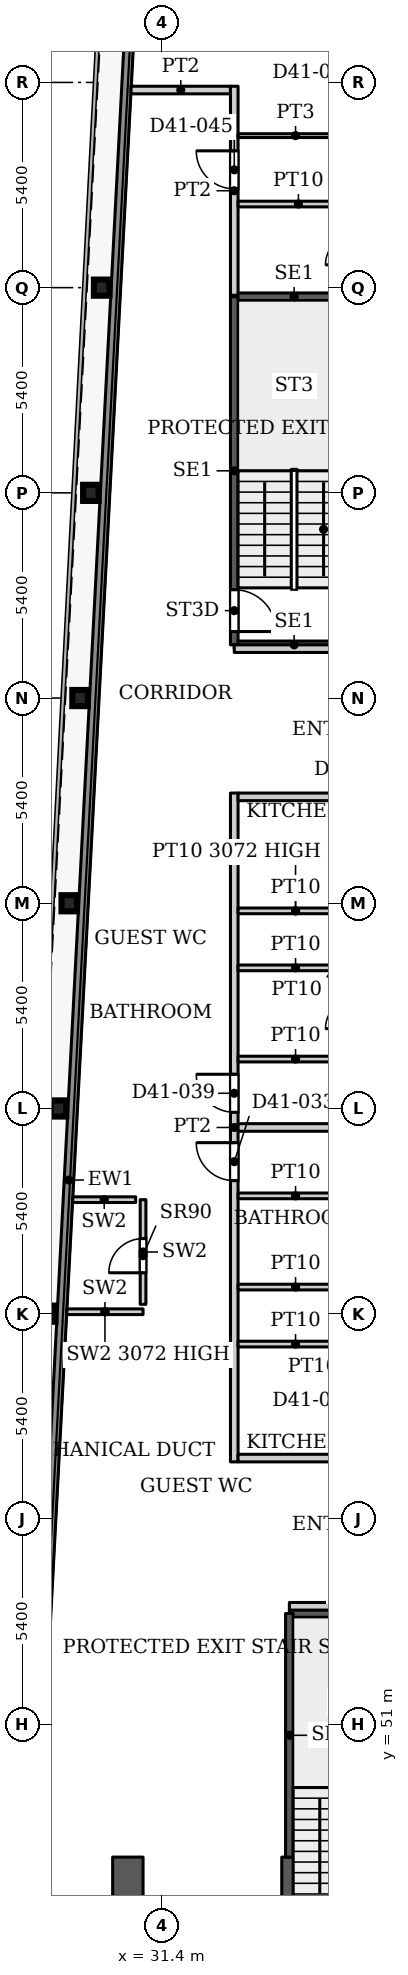
"""IFC4 building model, lengths in metres.
Left out: names, types, materials, properties, quantities, classifications, styles, units other than length and angle.
Written with IfcOpenShell. Run it as: python <this file> out.ifc"""

import sys

from ifc_helpers import new_model, si_unit, direction, frame, frame_2d, origin, origin_2d, place, context, subcontext, project, spatial, rectangle, i_section, extrude, source, transform, mapped, element, fill, save


model = new_model("IFC4")
c1 = context("Model", 3, precision=1e-05, world=origin(), true_north=direction((0.0, 1.0)))
c2 = subcontext(c1, "Body", "Model", "MODEL_VIEW")
j1 = project(units=[si_unit("LENGTHUNIT", "METRE"), si_unit("PLANEANGLEUNIT", "RADIAN")], contexts=[c1])
p1 = place(None, origin())
s1 = spatial("IfcSite", under=j1, at=p1, CompositionType="ELEMENT")
p2 = place(p1, origin())
s2 = spatial("IfcBuilding", under=s1, at=p2, CompositionType="ELEMENT")
p3 = place(p2, frame((0.0, 0.0, 179.9)))
s3 = spatial("IfcBuildingStorey", under=s2, at=p3, CompositionType="ELEMENT", Elevation=179.9)
for number, where, z_axis, x_axis in (
    (1, (28.39, 61.8, 0.0), (0.0, 0.0, 1.0), (1.0, 0.0, 0.0)),
    (2, (28.674, 67.2, 0.0), (0.0, 0.0, 1.0), (1.0, 0.0, 0.0)),
    (3, (28.958, 72.6, 0.0), (0.0, 0.0, 1.0), (1.0, 0.0, 0.0)),
    (4, (29.243, 78.0, 0.0), (0.0, 0.0, 1.0), (1.0, 0.0, 0.0)),
    (5, (29.527, 83.4, 0.0), (0.0, 0.0, 1.0), (1.0, 0.0, 0.0)),
    (6, (29.811, 88.8, 0.0), (0.0, 0.0, 1.0), (1.0, 0.0, 0.0)),
):
    element("IfcColumn", number, at=place(p3, frame(where, z_axis=z_axis, x_axis=x_axis)), inside=s3, PredefinedType="COLUMN", context=c2, shape_type="SweptSolid", body=[
        extrude(i_section(OverallWidth=0.409, OverallDepth=0.425, WebThickness=0.033, FlangeThickness=0.052, FilletRadius=0.013, at=origin_2d()), origin(), (0.0, 0.0, 1.0), 3.9),
    ])
p4 = place(p3, frame((34.75, 29.05, 0.0), z_axis=(0.0, 0.0, 1.0), x_axis=(0.0, 1.0, 0.0)))
e7 = element("IfcWall", 7, at=p4, inside=s3, PredefinedType="SHEAR", context=c2, shape_type="SweptSolid", body=[
    extrude(rectangle(XDim=18.45, YDim=0.4, at=frame_2d((9.225, 0.0))), origin(), (0.0, 0.0, 1.0), 3.9),
])
p5 = place(p4, frame((8.025, 0.0, 0.0)))
e8 = element("IfcOpeningElement", 8, at=p5, cuts=e7, PredefinedType="OPENING", context=c2, shape_type="SweptSolid", body=[
    extrude(rectangle(XDim=1.1, YDim=2.2, at=frame_2d((0.55, 1.1))), frame((0.0, 0.21, 0.0), z_axis=(0.0, -1.0, 0.0), x_axis=(1.0, 0.0, 0.0)), (0.0, 0.0, 1.0), 0.42),
])
p6 = place(p4, frame((10.875, 0.0, 0.0)))
e9 = element("IfcOpeningElement", 9, at=p6, cuts=e7, PredefinedType="OPENING", context=c2, shape_type="SweptSolid", body=[
    extrude(rectangle(XDim=1.1, YDim=2.2, at=frame_2d((0.55, 1.1))), frame((0.0, 0.21, 0.0), z_axis=(0.0, -1.0, 0.0), x_axis=(1.0, 0.0, 0.0)), (0.0, 0.0, 1.0), 0.42),
])
p7 = place(p4, frame((13.725, 0.0, 0.0)))
e10 = element("IfcOpeningElement", 10, at=p7, cuts=e7, PredefinedType="OPENING", context=c2, shape_type="SweptSolid", body=[
    extrude(rectangle(XDim=1.1, YDim=2.2, at=frame_2d((0.55, 1.1))), frame((0.0, 0.21, 0.0), z_axis=(0.0, -1.0, 0.0), x_axis=(1.0, 0.0, 0.0)), (0.0, 0.0, 1.0), 0.42),
])
p8 = place(p4, frame((15.95, 0.0, 0.0)))
e11 = element("IfcOpeningElement", 11, at=p8, cuts=e7, PredefinedType="OPENING", context=c2, shape_type="SweptSolid", body=[
    extrude(rectangle(XDim=1.1, YDim=2.2, at=frame_2d((0.55, 1.1))), frame((0.0, 0.21, 0.0), z_axis=(0.0, -1.0, 0.0), x_axis=(1.0, 0.0, 0.0)), (0.0, 0.0, 1.0), 0.42),
])
p9 = place(p3, frame((30.5, 29.05, 0.0), z_axis=(0.0, 0.0, 1.0), x_axis=(0.0, 1.0, 0.0)))
e12 = element("IfcWall", 12, at=p9, inside=s3, PredefinedType="SHEAR", context=c2, shape_type="SweptSolid", body=[
    extrude(rectangle(XDim=18.45, YDim=0.8, at=frame_2d((9.225, 0.0))), origin(), (0.0, 0.0, 1.0), 3.9),
])
p10 = place(p9, frame((6.21, 0.0, 0.0)))
e13 = element("IfcOpeningElement", 13, at=p10, cuts=e12, PredefinedType="OPENING", context=c2, shape_type="SweptSolid", body=[
    extrude(rectangle(XDim=0.9, YDim=2.2, at=frame_2d((0.45, 1.1))), frame((0.0, 0.41, 0.0), z_axis=(0.0, -1.0, 0.0), x_axis=(1.0, 0.0, 0.0)), (0.0, 0.0, 1.0), 0.82),
])
p11 = place(p9, frame((10.684, 0.0, 0.0)))
e14 = element("IfcOpeningElement", 14, at=p11, cuts=e12, PredefinedType="OPENING", context=c2, shape_type="SweptSolid", body=[
    extrude(rectangle(XDim=0.9, YDim=2.2, at=frame_2d((0.45, 1.1))), frame((0.0, 0.41, 0.0), z_axis=(0.0, -1.0, 0.0), x_axis=(1.0, 0.0, 0.0)), (0.0, 0.0, 1.0), 0.82),
])
p12 = place(p3, frame((27.195, 31.969, 0.0), z_axis=(0.0, 0.0, 1.0), x_axis=(0.052554995867, 0.998618031286, 0.0)))
e15 = element("IfcWall", 15, at=p12, inside=s3, PredefinedType="SOLIDWALL", context=c2, shape_type="SweptSolid", body=[
    extrude(rectangle(XDim=66.787, YDim=0.25, at=frame_2d((33.394, 0.0))), origin(), (0.0, 0.0, 1.0), 3.75),
])
p13 = place(p3, frame((34.75, 53.91, 0.0), z_axis=(0.0, 0.0, 1.0), x_axis=(1.0, 0.0, 0.0)))
e16 = element("IfcWall", 16, at=p13, inside=s3, PredefinedType="SHEAR", context=c2, shape_type="SweptSolid", body=[
    extrude(rectangle(XDim=3.15, YDim=0.2, at=frame_2d((1.575, 0.0))), origin(), (0.0, 0.0, 1.0), 3.9),
])
p14 = place(p3, frame((34.75, 47.5, 0.0), z_axis=(0.0, 0.0, 1.0), x_axis=(0.0, 1.0, 0.0)))
e17 = element("IfcWall", 17, at=p14, inside=s3, PredefinedType="SHEAR", context=c2, shape_type="SweptSolid", body=[
    extrude(rectangle(XDim=6.41, YDim=0.2, at=frame_2d((3.205, 0.0))), origin(), (0.0, 0.0, 1.0), 3.9),
])
for number, where, z_axis, x_axis in (
    (18, (33.3, 79.4, 0.0), (0.0, 0.0, 1.0), (1.0, 0.0, 0.0)),
    (19, (33.3, 88.56, 0.0), (0.0, 0.0, 1.0), (1.0, 0.0, 0.0)),
):
    element("IfcWall", number, at=place(p3, frame(where, z_axis=z_axis, x_axis=x_axis)), inside=s3, PredefinedType="SHEAR", context=c2, shape_type="SweptSolid", body=[
        extrude(rectangle(XDim=3.15, YDim=0.2, at=frame_2d((1.575, 0.0))), origin(), (0.0, 0.0, 1.0), 3.9),
    ])
p15 = place(p3, frame((33.3, 79.4, 0.0), z_axis=(0.0, 0.0, 1.0), x_axis=(0.0, 1.0, 0.0)))
e20 = element("IfcWall", 20, at=p15, inside=s3, PredefinedType="SHEAR", context=c2, shape_type="SweptSolid", body=[
    extrude(rectangle(XDim=9.16, YDim=0.2, at=frame_2d((4.58, 0.0))), origin(), (0.0, 0.0, 1.0), 3.9),
])
p16 = place(p15, frame((0.35, 0.0, 0.0)))
e21 = element("IfcOpeningElement", 21, at=p16, cuts=e20, PredefinedType="OPENING", context=c2, shape_type="SweptSolid", body=[
    extrude(rectangle(XDim=1.1, YDim=2.2, at=frame_2d((0.55, 1.1))), frame((0.0, 0.11, 0.0), z_axis=(0.0, -1.0, 0.0), x_axis=(1.0, 0.0, 0.0)), (0.0, 0.0, 1.0), 0.22),
])
p17 = place(p3, frame((28.895, 61.851, 0.0), z_axis=(0.0, 0.0, 1.0), x_axis=(1.0, 0.0, 0.0)))
e22 = element("IfcWall", 22, at=p17, inside=s3, PredefinedType="PARTITIONING", context=c2, shape_type="SweptSolid", body=[
    extrude(rectangle(XDim=2.005, YDim=0.15, at=frame_2d((1.002, 0.0))), origin(), (0.0, 0.0, 1.0), 3.072),
])
p18 = place(p3, frame((30.9, 62.046, 0.0), z_axis=(0.0, 0.0, 1.0), x_axis=(0.0, 1.0, 0.0)))
e23 = element("IfcWall", 23, at=p18, inside=s3, PredefinedType="PARTITIONING", context=c2, shape_type="SweptSolid", body=[
    extrude(rectangle(XDim=2.754, YDim=0.15, at=frame_2d((1.377, 0.0))), origin(), (0.0, 0.0, 1.0), 3.9),
])
p19 = place(p18, frame((0.83, 0.0, 0.0)))
e24 = element("IfcOpeningElement", 24, at=p19, cuts=e23, PredefinedType="OPENING", context=c2, shape_type="SweptSolid", body=[
    extrude(rectangle(XDim=0.9, YDim=2.2, at=frame_2d((0.45, 1.1))), frame((0.0, 0.085, 0.0), z_axis=(0.0, -1.0, 0.0), x_axis=(1.0, 0.0, 0.0)), (0.0, 0.0, 1.0), 0.17),
])
p20 = place(p3, frame((29.05, 64.8, 0.0), z_axis=(0.0, 0.0, 1.0), x_axis=(1.0, 0.0, 0.0)))
e25 = element("IfcWall", 25, at=p20, inside=s3, PredefinedType="PARTITIONING", context=c2, shape_type="SweptSolid", body=[
    extrude(rectangle(XDim=1.655, YDim=0.15, at=frame_2d((0.828, 0.0))), origin(), (0.0, 0.0, 1.0), 3.9),
])
p21 = place(p3, frame((30.585, 94.0, 0.0), z_axis=(0.0, 0.0, 1.0), x_axis=(1.0, 0.0, 0.0)))
e26 = element("IfcWall", 26, at=p21, inside=s3, PredefinedType="PARTITIONING", context=c2, shape_type="SweptSolid", body=[
    extrude(rectangle(XDim=2.615, YDim=0.2, at=frame_2d((1.308, 0.0))), origin(), (0.0, 0.0, 1.0), 3.6),
])
p22 = place(p3, frame((33.3, 57.9, 0.0), z_axis=(0.0, 0.0, 1.0), x_axis=(0.0, 1.0, 0.0)))
e27 = element("IfcWall", 27, at=p22, inside=s3, PredefinedType="PARTITIONING", context=c2, shape_type="SweptSolid", body=[
    extrude(rectangle(XDim=17.6, YDim=0.2, at=frame_2d((8.8, 0.0))), origin(), (0.0, 0.0, 1.0), 3.6),
])
p23 = place(p22, frame((7.4, 0.0, 0.0)))
e28 = element("IfcOpeningElement", 28, at=p23, cuts=e27, PredefinedType="OPENING", context=c2, shape_type="SweptSolid", body=[
    extrude(rectangle(XDim=1.0, YDim=2.1, at=frame_2d((0.5, 1.05))), frame((0.0, 0.11, 0.0), z_axis=(0.0, -1.0, 0.0), x_axis=(1.0, 0.0, 0.0)), (0.0, 0.0, 1.0), 0.22),
])
p24 = place(p22, frame((9.2, 0.0, 0.0)))
e29 = element("IfcOpeningElement", 29, at=p24, cuts=e27, PredefinedType="OPENING", context=c2, shape_type="SweptSolid", body=[
    extrude(rectangle(XDim=1.0, YDim=2.1, at=frame_2d((0.5, 1.05))), frame((0.0, 0.11, 0.0), z_axis=(0.0, -1.0, 0.0), x_axis=(1.0, 0.0, 0.0)), (0.0, 0.0, 1.0), 0.22),
])
p25 = place(p3, frame((33.3, 79.3, 0.0), z_axis=(0.0, 0.0, 1.0), x_axis=(1.0, 0.0, 0.0)))
e30 = element("IfcWall", 30, at=p25, inside=s3, PredefinedType="PARTITIONING", context=c2, shape_type="SweptSolid", body=[
    extrude(rectangle(XDim=12.6, YDim=0.2, at=frame_2d((6.3, 0.0))), origin(), (0.0, 0.0, 1.0), 3.6),
])
p26 = place(p25, frame((5.795, 0.0, 0.0)))
e31 = element("IfcOpeningElement", 31, at=p26, cuts=e30, PredefinedType="OPENING", context=c2, shape_type="SweptSolid", body=[
    extrude(rectangle(XDim=1.0, YDim=2.1, at=frame_2d((0.5, 1.05))), frame((0.0, 0.11, 0.0), z_axis=(0.0, -1.0, 0.0), x_axis=(1.0, 0.0, 0.0)), (0.0, 0.0, 1.0), 0.22),
])
p27 = place(p3, frame((33.3, 88.6, 0.0), z_axis=(0.0, 0.0, 1.0), x_axis=(0.0, 1.0, 0.0)))
e32 = element("IfcWall", 32, at=p27, inside=s3, PredefinedType="PARTITIONING", context=c2, shape_type="SweptSolid", body=[
    extrude(rectangle(XDim=5.5, YDim=0.2, at=frame_2d((2.75, 0.0))), origin(), (0.0, 0.0, 1.0), 3.6),
])
p28 = place(p27, frame((2.8, 0.0, 0.0)))
e33 = element("IfcOpeningElement", 33, at=p28, cuts=e32, PredefinedType="OPENING", context=c2, shape_type="SweptSolid", body=[
    extrude(rectangle(XDim=1.0, YDim=2.1, at=frame_2d((0.5, 1.05))), frame((0.0, 0.11, 0.0), z_axis=(0.0, -1.0, 0.0), x_axis=(1.0, 0.0, 0.0)), (0.0, 0.0, 1.0), 0.22),
])
p29 = place(p3, frame((33.4, 58.0, 0.0), z_axis=(0.0, 0.0, 1.0), x_axis=(1.0, 0.0, 0.0)))
e34 = element("IfcWall", 34, at=p29, inside=s3, PredefinedType="PARTITIONING", context=c2, shape_type="SweptSolid", body=[
    extrude(rectangle(XDim=12.5, YDim=0.2, at=frame_2d((6.25, 0.0))), origin(), (0.0, 0.0, 1.0), 3.6),
])
for number, where, z_axis, x_axis in (
    (35, (33.4, 61.0, 0.0), (0.0, 0.0, 1.0), (1.0, 0.0, 0.0)),
    (36, (33.4, 62.5, 0.0), (0.0, 0.0, 1.0), (1.0, 0.0, 0.0)),
    (37, (33.4, 64.9, 0.0), (0.0, 0.0, 1.0), (1.0, 0.0, 0.0)),
):
    element("IfcWall", number, at=place(p3, frame(where, z_axis=z_axis, x_axis=x_axis)), inside=s3, PredefinedType="PARTITIONING", context=c2, shape_type="SweptSolid", body=[
        extrude(rectangle(XDim=3.025, YDim=0.15, at=frame_2d((1.513, 0.0))), origin(), (0.0, 0.0, 1.0), 3.6),
    ])
p30 = place(p3, frame((33.4, 66.7, 0.0), z_axis=(0.0, 0.0, 1.0), x_axis=(1.0, 0.0, 0.0)))
e38 = element("IfcWall", 38, at=p30, inside=s3, PredefinedType="PARTITIONING", context=c2, shape_type="SweptSolid", body=[
    extrude(rectangle(XDim=12.5, YDim=0.2, at=frame_2d((6.25, 0.0))), origin(), (0.0, 0.0, 1.0), 3.6),
])
for number, where, z_axis, x_axis in (
    (39, (33.4, 68.5, 0.0), (0.0, 0.0, 1.0), (1.0, 0.0, 0.0)),
    (40, (33.4, 70.9, 0.0), (0.0, 0.0, 1.0), (1.0, 0.0, 0.0)),
):
    element("IfcWall", number, at=place(p3, frame(where, z_axis=z_axis, x_axis=x_axis)), inside=s3, PredefinedType="PARTITIONING", context=c2, shape_type="SweptSolid", body=[
        extrude(rectangle(XDim=3.025, YDim=0.15, at=frame_2d((1.513, 0.0))), origin(), (0.0, 0.0, 1.0), 3.6),
    ])
p31 = place(p3, frame((33.4, 72.4, 0.0), z_axis=(0.0, 0.0, 1.0), x_axis=(1.0, 0.0, 0.0)))
e41 = element("IfcWall", 41, at=p31, inside=s3, PredefinedType="PARTITIONING", context=c2, shape_type="SweptSolid", body=[
    extrude(rectangle(XDim=3.025, YDim=0.15, at=frame_2d((1.513, 0.0))), origin(), (0.0, 0.0, 1.0), 3.072),
])
p32 = place(p3, frame((33.4, 75.4, 0.0), z_axis=(0.0, 0.0, 1.0), x_axis=(1.0, 0.0, 0.0)))
e42 = element("IfcWall", 42, at=p32, inside=s3, PredefinedType="PARTITIONING", context=c2, shape_type="SweptSolid", body=[
    extrude(rectangle(XDim=12.5, YDim=0.2, at=frame_2d((6.25, 0.0))), origin(), (0.0, 0.0, 1.0), 3.6),
])
p33 = place(p3, frame((33.4, 91.0, 0.0), z_axis=(0.0, 0.0, 1.0), x_axis=(1.0, 0.0, 0.0)))
e43 = element("IfcWall", 43, at=p33, inside=s3, PredefinedType="PARTITIONING", context=c2, shape_type="SweptSolid", body=[
    extrude(rectangle(XDim=3.175, YDim=0.15, at=frame_2d((1.587, 0.0))), origin(), (0.0, 0.0, 1.0), 3.6),
])
p34 = place(p3, frame((33.4, 92.8, 0.0), z_axis=(0.0, 0.0, 1.0), x_axis=(1.0, 0.0, 0.0)))
e44 = element("IfcWall", 44, at=p34, inside=s3, PredefinedType="PARTITIONING", context=c2, shape_type="SweptSolid", body=[
    extrude(rectangle(XDim=3.025, YDim=0.1, at=frame_2d((1.513, 0.0))), origin(), (0.0, 0.0, 1.0), 3.6),
])
p35 = place(p3, frame((34.75, 54.1, 0.0), z_axis=(0.0, 0.0, 1.0), x_axis=(1.0, 0.0, 0.0)))
e45 = element("IfcWall", 45, at=p35, inside=s3, PredefinedType="PARTITIONING", context=c2, shape_type="SweptSolid", body=[
    extrude(rectangle(XDim=11.15, YDim=0.2, at=frame_2d((5.575, 0.0))), origin(), (0.0, 0.0, 1.0), 3.6),
])
p36 = place(p35, frame((5.075, 0.0, 0.0)))
e46 = element("IfcOpeningElement", 46, at=p36, cuts=e45, PredefinedType="OPENING", context=c2, shape_type="SweptSolid", body=[
    extrude(rectangle(XDim=1.0, YDim=2.1, at=frame_2d((0.5, 1.05))), frame((0.0, 0.11, 0.0), z_axis=(0.0, -1.0, 0.0), x_axis=(1.0, 0.0, 0.0)), (0.0, 0.0, 1.0), 0.22),
])
m1 = source(origin(), c2, "Body", "SweptSolid", [
    extrude(rectangle(XDim=0.9, YDim=2.2, at=frame_2d((0.45, 1.1))), frame((0.0, 0.025, 0.0), z_axis=(0.0, -1.0, 0.0), x_axis=(1.0, 0.0, 0.0)), (0.0, 0.0, 1.0), 0.05),
])
p37 = place(p19, origin())
e47 = element("IfcDoor", 47, at=p37, inside=s3, OperationType="SINGLE_SWING_LEFT", PredefinedType="DOOR", context=c2, shape_type="MappedRepresentation", body=[
    mapped(m1, transform((0.0, 0.0, 0.0), x_axis=(1.0, 0.0, 0.0), y_axis=(0.0, 1.0, 0.0), z_axis=(0.0, 0.0, 1.0), scale=1.0)),
])
fill(e24, e47)
m2 = source(origin(), c2, "Body", "SweptSolid", [
    extrude(rectangle(XDim=1.1, YDim=2.2, at=frame_2d((0.55, 1.1))), frame((0.0, 0.025, 0.0), z_axis=(0.0, -1.0, 0.0), x_axis=(1.0, 0.0, 0.0)), (0.0, 0.0, 1.0), 0.05),
])
p38 = place(p16, origin())
e48 = element("IfcDoor", 48, at=p38, inside=s3, OperationType="SINGLE_SWING_RIGHT", PredefinedType="DOOR", context=c2, shape_type="MappedRepresentation", body=[
    mapped(m2, transform((0.0, 0.0, 0.0), x_axis=(1.0, 0.0, 0.0), y_axis=(0.0, 1.0, 0.0), z_axis=(0.0, 0.0, 1.0), scale=1.0)),
])
fill(e21, e48)
m3 = source(origin(), c2, "Body", "SweptSolid", [
    extrude(rectangle(XDim=1.0, YDim=2.1, at=frame_2d((0.5, 1.05))), frame((0.0, 0.025, 0.0), z_axis=(0.0, -1.0, 0.0), x_axis=(1.0, 0.0, 0.0)), (0.0, 0.0, 1.0), 0.05),
])
p39 = place(p23, origin())
e49 = element("IfcDoor", 49, at=p39, inside=s3, OperationType="SINGLE_SWING_LEFT", PredefinedType="DOOR", context=c2, shape_type="MappedRepresentation", body=[
    mapped(m3, transform((0.0, 0.0, 0.0), x_axis=(1.0, 0.0, 0.0), y_axis=(0.0, 1.0, 0.0), z_axis=(0.0, 0.0, 1.0), scale=1.0)),
])
fill(e28, e49)
p40 = place(p24, origin())
e50 = element("IfcDoor", 50, at=p40, inside=s3, OperationType="SINGLE_SWING_LEFT", PredefinedType="DOOR", context=c2, shape_type="MappedRepresentation", body=[
    mapped(m3, transform((0.0, 0.0, 0.0), x_axis=(1.0, 0.0, 0.0), y_axis=(0.0, 1.0, 0.0), z_axis=(0.0, 0.0, 1.0), scale=1.0)),
])
fill(e29, e50)
p41 = place(p28, origin())
e51 = element("IfcDoor", 51, at=p41, inside=s3, OperationType="SINGLE_SWING_LEFT", PredefinedType="DOOR", context=c2, shape_type="MappedRepresentation", body=[
    mapped(m3, transform((0.0, 0.0, 0.0), x_axis=(1.0, 0.0, 0.0), y_axis=(0.0, 1.0, 0.0), z_axis=(0.0, 0.0, 1.0), scale=1.0)),
])
fill(e33, e51)
save(model, sys.argv[1])
